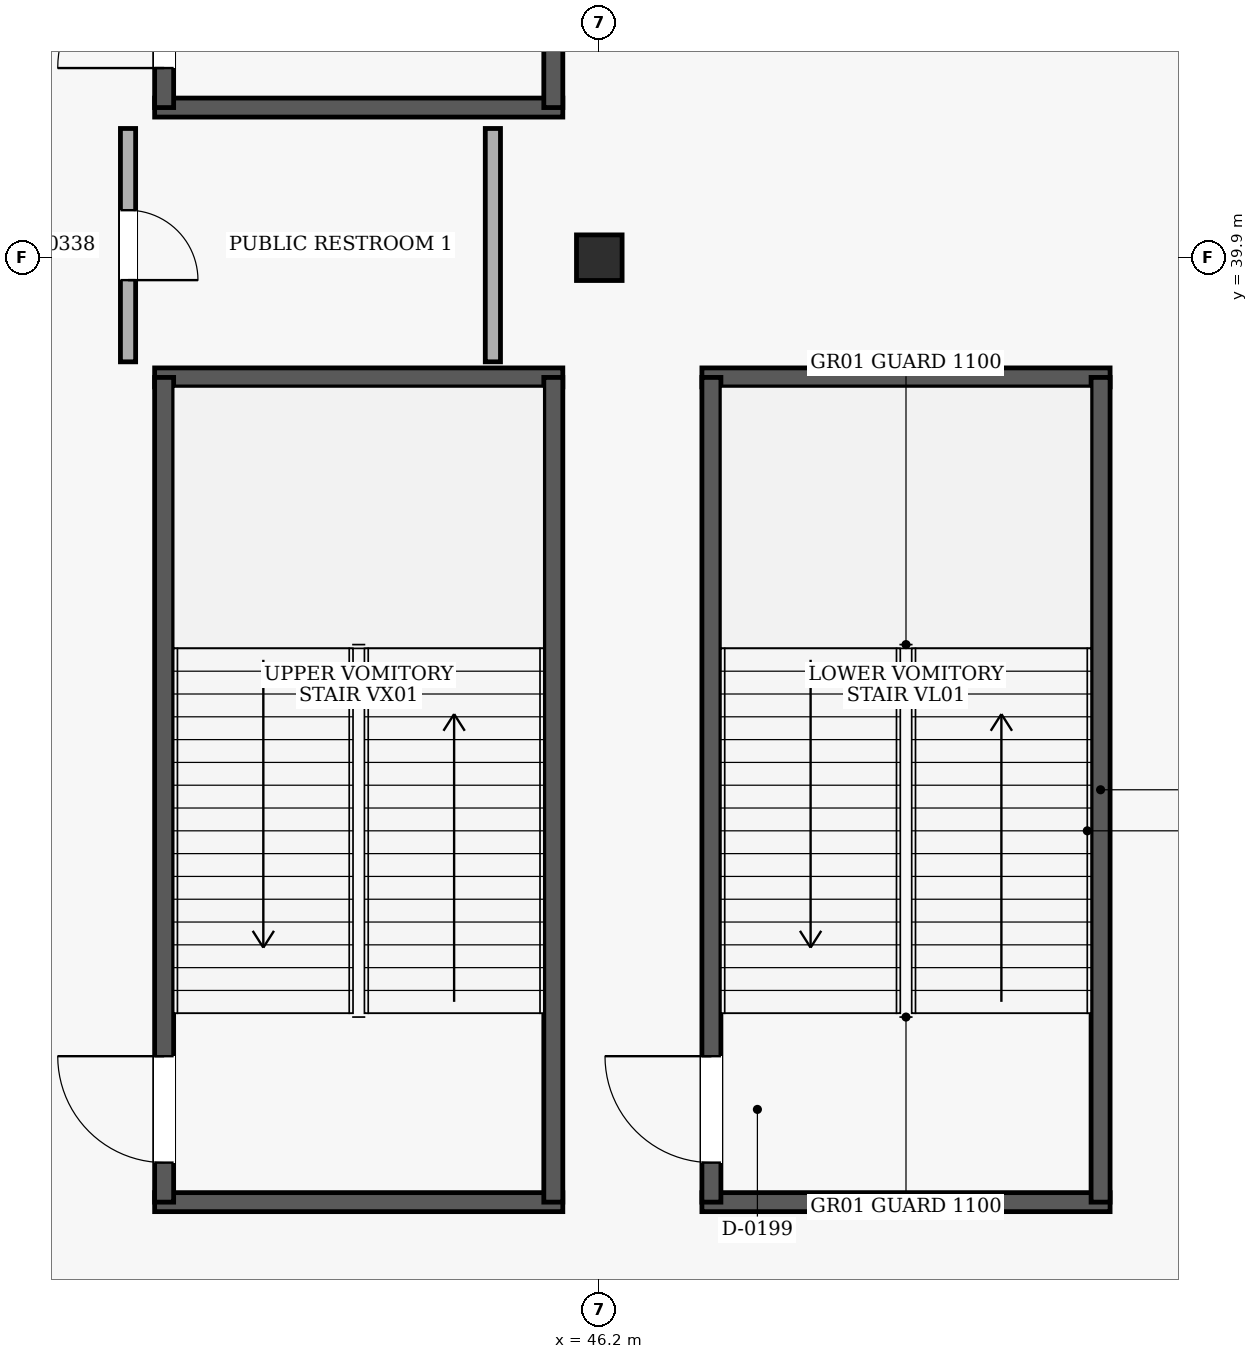
"""IFC4 building model, lengths in metres.
Left out: names, types, materials, properties, quantities, classifications, styles, units other than length and angle.
Written with IfcOpenShell. Run it as: python <this file> out.ifc"""

import sys

from ifc_helpers import new_model, si_unit, direction, frame, frame_2d, origin, origin_2d, place, context, subcontext, project, spatial, rectangle, extrude, element, fill, save


model = new_model("IFC4")
c1 = context("Model", 3, precision=1e-05, world=origin(), true_north=direction((0.0, 1.0)))
c2 = subcontext(c1, "Body", "Model", "MODEL_VIEW")
j1 = project(units=[si_unit("LENGTHUNIT", "METRE"), si_unit("PLANEANGLEUNIT", "RADIAN")], contexts=[c1])
p1 = place(None, origin())
s1 = spatial("IfcSite", under=j1, at=p1, CompositionType="ELEMENT")
p2 = place(p1, origin())
s2 = spatial("IfcBuilding", under=s1, at=p2, CompositionType="ELEMENT")
p3 = place(p2, origin())
s3 = spatial("IfcBuildingStorey", under=s2, at=p3, CompositionType="ELEMENT", Elevation=0.0)
p4 = place(p3, frame((46.2, 39.9, 0.0), z_axis=(0.0, 0.0, 1.0), x_axis=(1.0, 0.0, 0.0)))
e1 = element("IfcColumn", 1, at=p4, inside=s3, PredefinedType="COLUMN", context=c2, shape_type="SweptSolid", body=[
    extrude(rectangle(XDim=0.6, YDim=0.6, at=origin_2d()), origin(), (0.0, 0.0, 1.0), 5.4),
])
for number, where, z_axis, x_axis in (
    (2, (40.35, 27.475, 0.0), (0.0, 0.0, 1.0), (1.0, 0.0, 0.0)),
    (3, (45.72, 38.325, 0.0), (0.0, 0.0, 1.0), (-1.0, 0.0, 0.0)),
):
    element("IfcWall", number, at=place(p3, frame(where, z_axis=z_axis, x_axis=x_axis)), inside=s3, PredefinedType="SHEAR", context=c2, shape_type="SweptSolid", body=[
        extrude(rectangle(XDim=5.37, YDim=0.25, at=frame_2d((2.685, 0.0))), origin(), (0.0, 0.0, 1.0), 5.08),
    ])
p5 = place(p3, frame((40.475, 27.475, 0.0), z_axis=(0.0, 0.0, 1.0), x_axis=(0.0, 1.0, 0.0)))
e4 = element("IfcWall", 4, at=p5, inside=s3, PredefinedType="SHEAR", context=c2, shape_type="SweptSolid", body=[
    extrude(rectangle(XDim=10.85, YDim=0.25, at=frame_2d((5.425, 0.0))), origin(), (0.0, 0.0, 1.0), 5.08),
])
p6 = place(p5, frame((0.52, 0.0, 0.0)))
e5 = element("IfcOpeningElement", 5, at=p6, cuts=e4, PredefinedType="OPENING", context=c2, shape_type="SweptSolid", body=[
    extrude(rectangle(XDim=1.4, YDim=2.15, at=frame_2d((0.7, 1.075))), frame((0.0, 0.135, 0.0), z_axis=(0.0, -1.0, 0.0), x_axis=(1.0, 0.0, 0.0)), (0.0, 0.0, 1.0), 0.27),
])
p7 = place(p3, frame((45.595, 27.475, 0.0), z_axis=(0.0, 0.0, 1.0), x_axis=(0.0, 1.0, 0.0)))
e6 = element("IfcWall", 6, at=p7, inside=s3, PredefinedType="SHEAR", context=c2, shape_type="SweptSolid", body=[
    extrude(rectangle(XDim=10.85, YDim=0.25, at=frame_2d((5.425, 0.0))), origin(), (0.0, 0.0, 1.0), 5.08),
])
p8 = place(p3, frame((40.35, 41.875, 0.0), z_axis=(0.0, 0.0, 1.0), x_axis=(1.0, 0.0, 0.0)))
e7 = element("IfcWall", 7, at=p8, inside=s3, PredefinedType="SHEAR", context=c2, shape_type="SweptSolid", body=[
    extrude(rectangle(XDim=5.37, YDim=0.25, at=frame_2d((2.685, 0.0))), origin(), (0.0, 0.0, 1.0), 5.08),
])
p9 = place(p3, frame((40.475, 41.875, 0.0), z_axis=(0.0, 0.0, 1.0), x_axis=(0.0, 1.0, 0.0)))
e8 = element("IfcWall", 8, at=p9, inside=s3, PredefinedType="SHEAR", context=c2, shape_type="SweptSolid", body=[
    extrude(rectangle(XDim=10.85, YDim=0.25, at=frame_2d((5.425, 0.0))), origin(), (0.0, 0.0, 1.0), 5.08),
])
p10 = place(p9, frame((0.52, 0.0, 0.0)))
e9 = element("IfcOpeningElement", 9, at=p10, cuts=e8, PredefinedType="OPENING", context=c2, shape_type="SweptSolid", body=[
    extrude(rectangle(XDim=1.4, YDim=2.15, at=frame_2d((0.7, 1.075))), frame((0.0, 0.135, 0.0), z_axis=(0.0, -1.0, 0.0), x_axis=(1.0, 0.0, 0.0)), (0.0, 0.0, 1.0), 0.27),
])
p11 = place(p3, frame((45.595, 41.875, 0.0), z_axis=(0.0, 0.0, 1.0), x_axis=(0.0, 1.0, 0.0)))
e10 = element("IfcWall", 10, at=p11, inside=s3, PredefinedType="SHEAR", context=c2, shape_type="SweptSolid", body=[
    extrude(rectangle(XDim=10.85, YDim=0.25, at=frame_2d((5.425, 0.0))), origin(), (0.0, 0.0, 1.0), 5.08),
])
for number, where, z_axis, x_axis in (
    (11, (47.55, 27.475, 0.0), (0.0, 0.0, 1.0), (1.0, 0.0, 0.0)),
    (12, (52.92, 38.325, 0.0), (0.0, 0.0, 1.0), (-1.0, 0.0, 0.0)),
):
    element("IfcWall", number, at=place(p3, frame(where, z_axis=z_axis, x_axis=x_axis)), inside=s3, PredefinedType="SHEAR", context=c2, shape_type="SweptSolid", body=[
        extrude(rectangle(XDim=5.37, YDim=0.25, at=frame_2d((2.685, 0.0))), origin(), (0.0, 0.0, 1.0), 5.08),
    ])
p12 = place(p3, frame((47.675, 27.475, 0.0), z_axis=(0.0, 0.0, 1.0), x_axis=(0.0, 1.0, 0.0)))
e13 = element("IfcWall", 13, at=p12, inside=s3, PredefinedType="SHEAR", context=c2, shape_type="SweptSolid", body=[
    extrude(rectangle(XDim=10.85, YDim=0.25, at=frame_2d((5.425, 0.0))), origin(), (0.0, 0.0, 1.0), 5.08),
])
p13 = place(p12, frame((0.52, 0.0, 0.0)))
e14 = element("IfcOpeningElement", 14, at=p13, cuts=e13, PredefinedType="OPENING", context=c2, shape_type="SweptSolid", body=[
    extrude(rectangle(XDim=1.4, YDim=2.15, at=frame_2d((0.7, 1.075))), frame((0.0, 0.135, 0.0), z_axis=(0.0, -1.0, 0.0), x_axis=(1.0, 0.0, 0.0)), (0.0, 0.0, 1.0), 0.27),
])
p14 = place(p3, frame((52.795, 27.475, 0.0), z_axis=(0.0, 0.0, 1.0), x_axis=(0.0, 1.0, 0.0)))
e15 = element("IfcWall", 15, at=p14, inside=s3, PredefinedType="SHEAR", context=c2, shape_type="SweptSolid", body=[
    extrude(rectangle(XDim=10.85, YDim=0.25, at=frame_2d((5.425, 0.0))), origin(), (0.0, 0.0, 1.0), 5.08),
])
p15 = place(p3, frame((44.8, 38.53, 0.0), z_axis=(0.0, 0.0, 1.0), x_axis=(0.0, 1.0, 0.0)))
e16 = element("IfcWall", 16, at=p15, inside=s3, PredefinedType="PARTITIONING", context=c2, shape_type="SweptSolid", body=[
    extrude(rectangle(XDim=3.07, YDim=0.2, at=frame_2d((1.535, 0.0))), origin(), (0.0, 0.0, 1.0), 5.08),
])
p16 = place(p3, frame((40.0, 41.6, 0.0), z_axis=(0.0, 0.0, 1.0), x_axis=(0.0, -1.0, 0.0)))
e17 = element("IfcWall", 17, at=p16, inside=s3, PredefinedType="PARTITIONING", context=c2, shape_type="SweptSolid", body=[
    extrude(rectangle(XDim=3.07, YDim=0.2, at=frame_2d((1.535, 0.0))), origin(), (0.0, 0.0, 1.0), 5.08),
])
p17 = place(p16, frame((1.075, 0.0, 0.0)))
e18 = element("IfcOpeningElement", 18, at=p17, cuts=e17, PredefinedType="OPENING", context=c2, shape_type="SweptSolid", body=[
    extrude(rectangle(XDim=0.92, YDim=2.1, at=frame_2d((0.46, 1.05))), frame((0.0, 0.11, 0.0), z_axis=(0.0, -1.0, 0.0), x_axis=(1.0, 0.0, 0.0)), (0.0, 0.0, 1.0), 0.22),
])
p18 = place(p6, origin())
e19 = element("IfcDoor", 19, at=p18, inside=s3, OperationType="SINGLE_SWING_RIGHT", PredefinedType="DOOR", context=c2, shape_type="SweptSolid", body=[
    extrude(rectangle(XDim=1.4, YDim=2.15, at=frame_2d((0.7, 1.075))), frame((0.0, 0.025, 0.0), z_axis=(0.0, -1.0, 0.0), x_axis=(1.0, 0.0, 0.0)), (0.0, 0.0, 1.0), 0.05),
])
fill(e5, e19)
p19 = place(p10, origin())
e20 = element("IfcDoor", 20, at=p19, inside=s3, OperationType="SINGLE_SWING_LEFT", PredefinedType="DOOR", context=c2, shape_type="SweptSolid", body=[
    extrude(rectangle(XDim=1.4, YDim=2.15, at=frame_2d((0.7, 1.075))), frame((0.0, 0.025, 0.0), z_axis=(0.0, -1.0, 0.0), x_axis=(1.0, 0.0, 0.0)), (0.0, 0.0, 1.0), 0.05),
])
fill(e9, e20)
p20 = place(p13, origin())
e21 = element("IfcDoor", 21, at=p20, inside=s3, OperationType="SINGLE_SWING_RIGHT", PredefinedType="DOOR", context=c2, shape_type="SweptSolid", body=[
    extrude(rectangle(XDim=1.4, YDim=2.15, at=frame_2d((0.7, 1.075))), frame((0.0, 0.025, 0.0), z_axis=(0.0, -1.0, 0.0), x_axis=(1.0, 0.0, 0.0)), (0.0, 0.0, 1.0), 0.05),
])
fill(e14, e21)
p21 = place(p17, origin())
e22 = element("IfcDoor", 22, at=p21, inside=s3, OperationType="SINGLE_SWING_RIGHT", PredefinedType="DOOR", context=c2, shape_type="SweptSolid", body=[
    extrude(rectangle(XDim=0.92, YDim=2.1, at=frame_2d((0.46, 1.05))), frame((0.0, 0.025, 0.0), z_axis=(0.0, -1.0, 0.0), x_axis=(1.0, 0.0, 0.0)), (0.0, 0.0, 1.0), 0.05),
])
fill(e18, e22)
save(model, sys.argv[1])
